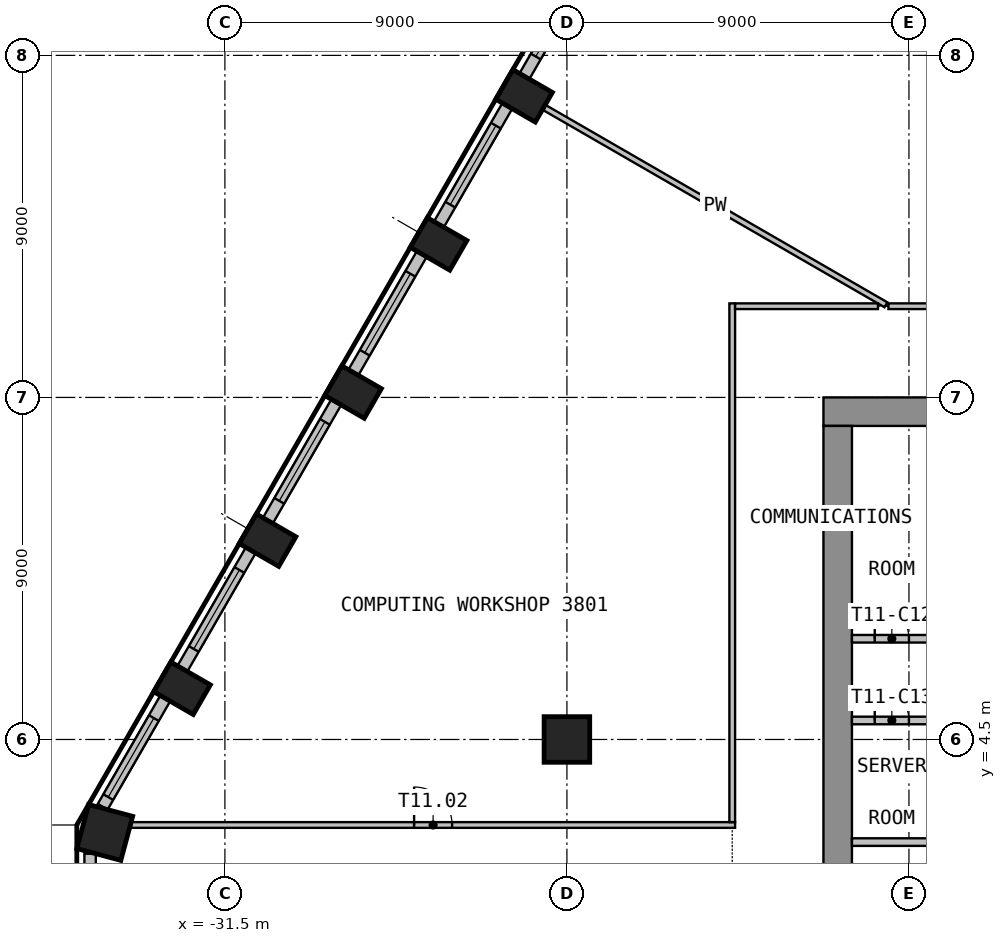
"""IFC4 building model, lengths in metres.
Left out: names, types, materials, properties, quantities, classifications, styles, units other than length and angle.
Written with IfcOpenShell. Run it as: python <this file> out.ifc"""

import sys

from ifc_helpers import new_model, si_unit, direction, frame, frame_2d, origin, origin_2d, place, context, subcontext, project, spatial, rectangle, circle, extrude, element, fill, save


model = new_model("IFC4")
c1 = context("Model", 3, precision=1e-05, world=origin(), true_north=direction((0.0, 1.0)))
c2 = subcontext(c1, "Body", "Model", "MODEL_VIEW")
j1 = project(units=[si_unit("LENGTHUNIT", "METRE"), si_unit("PLANEANGLEUNIT", "RADIAN")], contexts=[c1])
p1 = place(None, origin())
s1 = spatial("IfcSite", under=j1, at=p1, CompositionType="ELEMENT")
p2 = place(p1, origin())
s2 = spatial("IfcBuilding", under=s1, at=p2, CompositionType="ELEMENT")
p3 = place(p2, frame((0.0, 0.0, 156.0)))
s3 = spatial("IfcBuildingStorey", under=s2, at=p3, CompositionType="ELEMENT", Elevation=156.0)
for number, where, z_axis, x_axis in (
    (1, (-23.627, 21.436, 0.0), (0.0, 0.0, 1.0), (-0.5, -0.866, 0.0)),
    (2, (-25.877, 17.539, 0.0), (0.0, 0.0, 1.0), (-0.5, -0.866, 0.0)),
    (3, (-28.127, 13.641, 0.0), (0.0, 0.0, 1.0), (-0.5, -0.866, 0.0)),
    (4, (-30.377, 9.744, 0.0), (0.0, 0.0, 1.0), (-0.5, -0.866, 0.0)),
    (5, (-32.627, 5.847, 0.0), (0.0, 0.0, 1.0), (-0.5, -0.866, 0.0)),
):
    element("IfcColumn", number, at=place(p3, frame(where, z_axis=z_axis, x_axis=x_axis)), inside=s3, PredefinedType="COLUMN", context=c2, shape_type="SweptSolid", body=[
        extrude(rectangle(XDim=0.9, YDim=1.2, at=origin_2d()), origin(), (0.0, 0.0, 1.0), 3.575),
    ])
p4 = place(p3, frame((-34.662, 2.053, 0.0), z_axis=(0.0, 0.0, 1.0), x_axis=(-0.258819045103, -0.965925826289, 0.0)))
e6 = element("IfcColumn", 6, at=p4, inside=s3, PredefinedType="COLUMN", context=c2, shape_type="SweptSolid", body=[
    extrude(rectangle(XDim=1.2, YDim=1.2, at=origin_2d()), origin(), (0.0, 0.0, 1.0), 3.575),
])
p5 = place(p3, frame((-22.5, 4.5, 0.0), z_axis=(0.0, 0.0, 1.0), x_axis=(1.0, 0.0, 0.0)))
e7 = element("IfcColumn", 7, at=p5, inside=s3, PredefinedType="COLUMN", context=c2, shape_type="SweptSolid", body=[
    extrude(circle(Radius=0.6, at=origin_2d()), origin(), (0.0, 0.0, 1.0), 3.575),
])
p6 = place(p3, frame((-21.972, 24.803, 0.0), z_axis=(0.0, 0.0, 1.0), x_axis=(-0.500036802197, -0.866004154983, 0.0)))
e8 = element("IfcWall", 8, at=p6, inside=s3, PredefinedType="SOLIDWALL", context=c2, shape_type="SweptSolid", body=[
    extrude(rectangle(XDim=3.294, YDim=0.3, at=frame_2d((1.647, 0.0))), origin(), (0.0, 0.0, 1.0), 3.575),
])
p7 = place(p6, frame((0.294, 0.0, 0.9)))
e9 = element("IfcOpeningElement", 9, at=p7, cuts=e8, PredefinedType="OPENING", context=c2, shape_type="SweptSolid", body=[
    extrude(rectangle(XDim=2.4, YDim=2.1, at=frame_2d((1.2, 1.05))), frame((0.0, 0.16, 0.0), z_axis=(0.0, -1.0, 0.0), x_axis=(1.0, 0.0, 0.0)), (0.0, 0.0, 1.0), 0.32),
])
p8 = place(p3, frame((-24.069, 21.17, 0.0), z_axis=(0.0, 0.0, 1.0), x_axis=(-0.500027802648, -0.866009351323, 0.0)))
e10 = element("IfcWall", 10, at=p8, inside=s3, PredefinedType="SOLIDWALL", context=c2, shape_type="SweptSolid", body=[
    extrude(rectangle(XDim=3.599, YDim=0.3, at=frame_2d((1.799, 0.0))), origin(), (0.0, 0.0, 1.0), 3.575),
])
p9 = place(p8, frame((0.6, 0.0, 0.9)))
e11 = element("IfcOpeningElement", 11, at=p9, cuts=e10, PredefinedType="OPENING", context=c2, shape_type="SweptSolid", body=[
    extrude(rectangle(XDim=2.4, YDim=2.1, at=frame_2d((1.2, 1.05))), frame((0.0, 0.16, 0.0), z_axis=(0.0, -1.0, 0.0), x_axis=(1.0, 0.0, 0.0)), (0.0, 0.0, 1.0), 0.32),
])
p10 = place(p3, frame((-26.319, 17.273, 0.0), z_axis=(0.0, 0.0, 1.0), x_axis=(-0.500027802648, -0.866009351323, 0.0)))
e12 = element("IfcWall", 12, at=p10, inside=s3, PredefinedType="SOLIDWALL", context=c2, shape_type="SweptSolid", body=[
    extrude(rectangle(XDim=3.599, YDim=0.3, at=frame_2d((1.799, 0.0))), origin(), (0.0, 0.0, 1.0), 3.575),
])
p11 = place(p10, frame((0.6, 0.0, 0.9)))
e13 = element("IfcOpeningElement", 13, at=p11, cuts=e12, PredefinedType="OPENING", context=c2, shape_type="SweptSolid", body=[
    extrude(rectangle(XDim=2.4, YDim=2.1, at=frame_2d((1.2, 1.05))), frame((0.0, 0.16, 0.0), z_axis=(0.0, -1.0, 0.0), x_axis=(1.0, 0.0, 0.0)), (0.0, 0.0, 1.0), 0.32),
])
p12 = place(p3, frame((-28.569, 13.376, 0.0), z_axis=(0.0, 0.0, 1.0), x_axis=(-0.500027802648, -0.866009351323, 0.0)))
e14 = element("IfcWall", 14, at=p12, inside=s3, PredefinedType="SOLIDWALL", context=c2, shape_type="SweptSolid", body=[
    extrude(rectangle(XDim=3.599, YDim=0.3, at=frame_2d((1.799, 0.0))), origin(), (0.0, 0.0, 1.0), 3.575),
])
p13 = place(p12, frame((0.6, 0.0, 0.9)))
e15 = element("IfcOpeningElement", 15, at=p13, cuts=e14, PredefinedType="OPENING", context=c2, shape_type="SweptSolid", body=[
    extrude(rectangle(XDim=2.4, YDim=2.1, at=frame_2d((1.2, 1.05))), frame((0.0, 0.16, 0.0), z_axis=(0.0, -1.0, 0.0), x_axis=(1.0, 0.0, 0.0)), (0.0, 0.0, 1.0), 0.32),
])
p14 = place(p3, frame((-30.819, 9.479, 0.0), z_axis=(0.0, 0.0, 1.0), x_axis=(-0.500027802648, -0.866009351323, 0.0)))
e16 = element("IfcWall", 16, at=p14, inside=s3, PredefinedType="SOLIDWALL", context=c2, shape_type="SweptSolid", body=[
    extrude(rectangle(XDim=3.599, YDim=0.3, at=frame_2d((1.799, 0.0))), origin(), (0.0, 0.0, 1.0), 3.575),
])
p15 = place(p14, frame((0.6, 0.0, 0.9)))
e17 = element("IfcOpeningElement", 17, at=p15, cuts=e16, PredefinedType="OPENING", context=c2, shape_type="SweptSolid", body=[
    extrude(rectangle(XDim=2.4, YDim=2.1, at=frame_2d((1.2, 1.05))), frame((0.0, 0.16, 0.0), z_axis=(0.0, -1.0, 0.0), x_axis=(1.0, 0.0, 0.0)), (0.0, 0.0, 1.0), 0.32),
])
p16 = place(p3, frame((-33.069, 5.582, 0.0), z_axis=(0.0, 0.0, 1.0), x_axis=(-0.499981217486, -0.866036247602, 0.0)))
e18 = element("IfcWall", 18, at=p16, inside=s3, PredefinedType="SOLIDWALL", context=c2, shape_type="SweptSolid", body=[
    extrude(rectangle(XDim=3.294, YDim=0.3, at=frame_2d((1.647, 0.0))), origin(), (0.0, 0.0, 1.0), 3.575),
])
p17 = place(p16, frame((0.6, 0.0, 0.9)))
e19 = element("IfcOpeningElement", 19, at=p17, cuts=e18, PredefinedType="OPENING", context=c2, shape_type="SweptSolid", body=[
    extrude(rectangle(XDim=2.4, YDim=2.1, at=frame_2d((1.2, 1.05))), frame((0.0, 0.16, 0.0), z_axis=(0.0, -1.0, 0.0), x_axis=(1.0, 0.0, 0.0)), (0.0, 0.0, 1.0), 0.32),
])
p18 = place(p3, frame((-35.047, 1.495, 0.0), z_axis=(0.0, 0.0, 1.0), x_axis=(0.0, -1.0, 0.0)))
e20 = element("IfcWall", 20, at=p18, inside=s3, PredefinedType="SOLIDWALL", context=c2, shape_type="SweptSolid", body=[
    extrude(rectangle(XDim=2.989, YDim=0.3, at=frame_2d((1.495, 0.0))), origin(), (0.0, 0.0, 1.0), 3.575),
])
p19 = place(p18, frame((0.295, 0.0, 0.9)))
e21 = element("IfcOpeningElement", 21, at=p19, cuts=e20, PredefinedType="OPENING", context=c2, shape_type="SweptSolid", body=[
    extrude(rectangle(XDim=2.4, YDim=2.1, at=frame_2d((1.2, 1.05))), frame((0.0, 0.16, 0.0), z_axis=(0.0, -1.0, 0.0), x_axis=(1.0, 0.0, 0.0)), (0.0, 0.0, 1.0), 0.32),
])
p20 = place(p3, frame((-15.75, 13.125, 0.0), z_axis=(0.0, 0.0, 1.0), x_axis=(1.0, 0.0, 0.0)))
e22 = element("IfcWall", 22, at=p20, inside=s3, PredefinedType="SHEAR", context=c2, shape_type="SweptSolid", body=[
    extrude(rectangle(XDim=31.5, YDim=0.75, at=frame_2d((15.75, 0.0))), origin(), (0.0, 0.0, 1.0), 3.575),
])
p21 = place(p20, frame((14.55, 0.0, 0.0)))
e23 = element("IfcOpeningElement", 23, at=p21, cuts=e22, PredefinedType="OPENING", context=c2, shape_type="SweptSolid", body=[
    extrude(rectangle(XDim=2.4, YDim=2.1, at=frame_2d((1.2, 1.05))), frame((0.0, 0.385, 0.0), z_axis=(0.0, -1.0, 0.0), x_axis=(1.0, 0.0, 0.0)), (0.0, 0.0, 1.0), 0.77),
])
p22 = place(p20, frame((3.3, 0.0, 0.0)))
e24 = element("IfcOpeningElement", 24, at=p22, cuts=e22, PredefinedType="OPENING", context=c2, shape_type="SweptSolid", body=[
    extrude(rectangle(XDim=1.2, YDim=2.1, at=frame_2d((0.6, 1.05))), frame((0.0, 0.385, 0.0), z_axis=(0.0, -1.0, 0.0), x_axis=(1.0, 0.0, 0.0)), (0.0, 0.0, 1.0), 0.77),
])
p23 = place(p20, frame((27.0, 0.0, 0.0)))
e25 = element("IfcOpeningElement", 25, at=p23, cuts=e22, PredefinedType="OPENING", context=c2, shape_type="SweptSolid", body=[
    extrude(rectangle(XDim=1.2, YDim=2.1, at=frame_2d((0.6, 1.05))), frame((0.0, 0.385, 0.0), z_axis=(0.0, -1.0, 0.0), x_axis=(1.0, 0.0, 0.0)), (0.0, 0.0, 1.0), 0.77),
])
p24 = place(p3, frame((-15.375, -12.75, 0.0), z_axis=(0.0, 0.0, 1.0), x_axis=(0.0, 1.0, 0.0)))
e26 = element("IfcWall", 26, at=p24, inside=s3, PredefinedType="SHEAR", context=c2, shape_type="SweptSolid", body=[
    extrude(rectangle(XDim=25.5, YDim=0.75, at=frame_2d((12.75, 0.0))), origin(), (0.0, 0.0, 1.0), 3.575),
])
p25 = place(p24, frame((11.55, 0.0, 0.0)))
e27 = element("IfcOpeningElement", 27, at=p25, cuts=e26, PredefinedType="OPENING", context=c2, shape_type="SweptSolid", body=[
    extrude(rectangle(XDim=2.4, YDim=2.1, at=frame_2d((1.2, 1.05))), frame((0.0, 0.385, 0.0), z_axis=(0.0, -1.0, 0.0), x_axis=(1.0, 0.0, 0.0)), (0.0, 0.0, 1.0), 0.77),
])
p26 = place(p3, frame((-15.0, 7.15, 0.0), z_axis=(0.0, 0.0, 1.0), x_axis=(1.0, 0.0, 0.0)))
e28 = element("IfcWall", 28, at=p26, inside=s3, PredefinedType="PARTITIONING", context=c2, shape_type="SweptSolid", body=[
    extrude(rectangle(XDim=2.1, YDim=0.2, at=frame_2d((1.05, 0.0))), origin(), (0.0, 0.0, 1.0), 3.575),
])
p27 = place(p26, frame((0.6, 0.0, 0.0)))
e29 = element("IfcOpeningElement", 29, at=p27, cuts=e28, PredefinedType="OPENING", context=c2, shape_type="SweptSolid", body=[
    extrude(rectangle(XDim=0.9, YDim=2.1, at=frame_2d((0.45, 1.05))), frame((0.0, 0.11, 0.0), z_axis=(0.0, -1.0, 0.0), x_axis=(1.0, 0.0, 0.0)), (0.0, 0.0, 1.0), 0.22),
])
p28 = place(p3, frame((-15.0, 5.0, 0.0), z_axis=(0.0, 0.0, 1.0), x_axis=(1.0, 0.0, 0.0)))
e30 = element("IfcWall", 30, at=p28, inside=s3, PredefinedType="PARTITIONING", context=c2, shape_type="SweptSolid", body=[
    extrude(rectangle(XDim=2.1, YDim=0.2, at=frame_2d((1.05, 0.0))), origin(), (0.0, 0.0, 1.0), 3.575),
])
p29 = place(p28, frame((0.6, 0.0, 0.0)))
e31 = element("IfcOpeningElement", 31, at=p29, cuts=e30, PredefinedType="OPENING", context=c2, shape_type="SweptSolid", body=[
    extrude(rectangle(XDim=0.9, YDim=2.1, at=frame_2d((0.45, 1.05))), frame((0.0, 0.11, 0.0), z_axis=(0.0, -1.0, 0.0), x_axis=(1.0, 0.0, 0.0)), (0.0, 0.0, 1.0), 0.22),
])
p30 = place(p3, frame((-15.0, 1.8, 0.0), z_axis=(0.0, 0.0, 1.0), x_axis=(1.0, 0.0, 0.0)))
e32 = element("IfcWall", 32, at=p30, inside=s3, PredefinedType="PARTITIONING", context=c2, shape_type="SweptSolid", body=[
    extrude(rectangle(XDim=2.1, YDim=0.2, at=frame_2d((1.05, 0.0))), origin(), (0.0, 0.0, 1.0), 3.575),
])
p31 = place(p3, frame((-33.968, 2.25, 0.0), z_axis=(0.0, 0.0, 1.0), x_axis=(1.0, 0.0, 0.0)))
e33 = element("IfcWall", 33, at=p31, inside=s3, PredefinedType="PARTITIONING", context=c2, shape_type="SweptSolid", body=[
    extrude(rectangle(XDim=15.893, YDim=0.15, at=frame_2d((7.946, 0.0))), origin(), (0.0, 0.0, 1.0), 3.575),
])
p32 = place(p31, frame((7.446, 0.0, 0.0)))
e34 = element("IfcOpeningElement", 34, at=p32, cuts=e33, PredefinedType="OPENING", context=c2, shape_type="SweptSolid", body=[
    extrude(rectangle(XDim=1.0, YDim=2.1, at=frame_2d((0.5, 1.05))), frame((0.0, 0.085, 0.0), z_axis=(0.0, -1.0, 0.0), x_axis=(1.0, 0.0, 0.0)), (0.0, 0.0, 1.0), 0.17),
])
p33 = place(p3, frame((-23.09, 21.126, 0.0), z_axis=(0.0, 0.0, 1.0), x_axis=(0.86599279096, -0.500056482814, 0.0)))
e35 = element("IfcWall", 35, at=p33, inside=s3, PredefinedType="PARTITIONING", context=c2, shape_type="SweptSolid", body=[
    extrude(rectangle(XDim=10.376, YDim=0.15, at=frame_2d((5.188, 0.0))), origin(), (0.0, 0.0, 1.0), 3.575),
])
p34 = place(p3, frame((-18.15, 15.975, 0.0), z_axis=(0.0, 0.0, 1.0), x_axis=(0.0, -1.0, 0.0)))
e36 = element("IfcWall", 36, at=p34, inside=s3, PredefinedType="PARTITIONING", context=c2, shape_type="SweptSolid", body=[
    extrude(rectangle(XDim=13.65, YDim=0.15, at=frame_2d((6.825, 0.0))), origin(), (0.0, 0.0, 1.0), 3.575),
])
p35 = place(p3, frame((-14.315, 15.9, 0.0), z_axis=(0.0, 0.0, 1.0), x_axis=(-1.0, 0.0, 0.0)))
e37 = element("IfcWall", 37, at=p35, inside=s3, PredefinedType="PARTITIONING", context=c2, shape_type="SweptSolid", body=[
    extrude(rectangle(XDim=3.76, YDim=0.15, at=frame_2d((1.88, 0.0))), origin(), (0.0, 0.0, 1.0), 3.575),
])
p36 = place(p3, frame((-9.0, 15.9, 0.0), z_axis=(0.0, 0.0, 1.0), x_axis=(-1.0, 0.0, 0.0)))
e38 = element("IfcWall", 38, at=p36, inside=s3, PredefinedType="PARTITIONING", context=c2, shape_type="SweptSolid", body=[
    extrude(rectangle(XDim=5.04, YDim=0.15, at=frame_2d((2.52, 0.0))), origin(), (0.0, 0.0, 1.0), 3.575),
])
p37 = place(p36, frame((2.02, 0.0, 0.0)))
e39 = element("IfcOpeningElement", 39, at=p37, cuts=e38, PredefinedType="OPENING", context=c2, shape_type="SweptSolid", body=[
    extrude(rectangle(XDim=1.0, YDim=2.1, at=frame_2d((0.5, 1.05))), frame((0.0, 0.085, 0.0), z_axis=(0.0, -1.0, 0.0), x_axis=(1.0, 0.0, 0.0)), (0.0, 0.0, 1.0), 0.17),
])
p38 = place(p7, origin())
e40 = element("IfcWindow", 40, at=p38, inside=s3, PartitioningType="SINGLE_PANEL", PredefinedType="WINDOW", context=c2, shape_type="SweptSolid", body=[
    extrude(rectangle(XDim=2.4, YDim=2.1, at=frame_2d((1.2, 1.05))), frame((0.0, 0.03, 0.0), z_axis=(0.0, -1.0, 0.0), x_axis=(1.0, 0.0, 0.0)), (0.0, 0.0, 1.0), 0.06),
])
fill(e9, e40)
p39 = place(p9, origin())
e41 = element("IfcWindow", 41, at=p39, inside=s3, PartitioningType="SINGLE_PANEL", PredefinedType="WINDOW", context=c2, shape_type="SweptSolid", body=[
    extrude(rectangle(XDim=2.4, YDim=2.1, at=frame_2d((1.2, 1.05))), frame((0.0, 0.03, 0.0), z_axis=(0.0, -1.0, 0.0), x_axis=(1.0, 0.0, 0.0)), (0.0, 0.0, 1.0), 0.06),
])
fill(e11, e41)
p40 = place(p11, origin())
e42 = element("IfcWindow", 42, at=p40, inside=s3, PartitioningType="SINGLE_PANEL", PredefinedType="WINDOW", context=c2, shape_type="SweptSolid", body=[
    extrude(rectangle(XDim=2.4, YDim=2.1, at=frame_2d((1.2, 1.05))), frame((0.0, 0.03, 0.0), z_axis=(0.0, -1.0, 0.0), x_axis=(1.0, 0.0, 0.0)), (0.0, 0.0, 1.0), 0.06),
])
fill(e13, e42)
p41 = place(p13, origin())
e43 = element("IfcWindow", 43, at=p41, inside=s3, PartitioningType="SINGLE_PANEL", PredefinedType="WINDOW", context=c2, shape_type="SweptSolid", body=[
    extrude(rectangle(XDim=2.4, YDim=2.1, at=frame_2d((1.2, 1.05))), frame((0.0, 0.03, 0.0), z_axis=(0.0, -1.0, 0.0), x_axis=(1.0, 0.0, 0.0)), (0.0, 0.0, 1.0), 0.06),
])
fill(e15, e43)
p42 = place(p15, origin())
e44 = element("IfcWindow", 44, at=p42, inside=s3, PartitioningType="SINGLE_PANEL", PredefinedType="WINDOW", context=c2, shape_type="SweptSolid", body=[
    extrude(rectangle(XDim=2.4, YDim=2.1, at=frame_2d((1.2, 1.05))), frame((0.0, 0.03, 0.0), z_axis=(0.0, -1.0, 0.0), x_axis=(1.0, 0.0, 0.0)), (0.0, 0.0, 1.0), 0.06),
])
fill(e17, e44)
p43 = place(p17, origin())
e45 = element("IfcWindow", 45, at=p43, inside=s3, PartitioningType="SINGLE_PANEL", PredefinedType="WINDOW", context=c2, shape_type="SweptSolid", body=[
    extrude(rectangle(XDim=2.4, YDim=2.1, at=frame_2d((1.2, 1.05))), frame((0.0, 0.03, 0.0), z_axis=(0.0, -1.0, 0.0), x_axis=(1.0, 0.0, 0.0)), (0.0, 0.0, 1.0), 0.06),
])
fill(e19, e45)
p44 = place(p27, origin())
e46 = element("IfcDoor", 46, at=p44, inside=s3, OperationType="SINGLE_SWING_LEFT", PredefinedType="DOOR", context=c2, shape_type="SweptSolid", body=[
    extrude(rectangle(XDim=0.9, YDim=2.1, at=frame_2d((0.45, 1.05))), frame((0.0, 0.025, 0.0), z_axis=(0.0, -1.0, 0.0), x_axis=(1.0, 0.0, 0.0)), (0.0, 0.0, 1.0), 0.05),
])
fill(e29, e46)
p45 = place(p29, origin())
e47 = element("IfcDoor", 47, at=p45, inside=s3, OperationType="SINGLE_SWING_LEFT", PredefinedType="DOOR", context=c2, shape_type="SweptSolid", body=[
    extrude(rectangle(XDim=0.9, YDim=2.1, at=frame_2d((0.45, 1.05))), frame((0.0, 0.025, 0.0), z_axis=(0.0, -1.0, 0.0), x_axis=(1.0, 0.0, 0.0)), (0.0, 0.0, 1.0), 0.05),
])
fill(e31, e47)
p46 = place(p32, origin())
e48 = element("IfcDoor", 48, at=p46, inside=s3, OperationType="SINGLE_SWING_LEFT", PredefinedType="DOOR", context=c2, shape_type="SweptSolid", body=[
    extrude(rectangle(XDim=1.0, YDim=2.1, at=frame_2d((0.5, 1.05))), frame((0.0, 0.025, 0.0), z_axis=(0.0, -1.0, 0.0), x_axis=(1.0, 0.0, 0.0)), (0.0, 0.0, 1.0), 0.05),
])
fill(e34, e48)
save(model, sys.argv[1])
